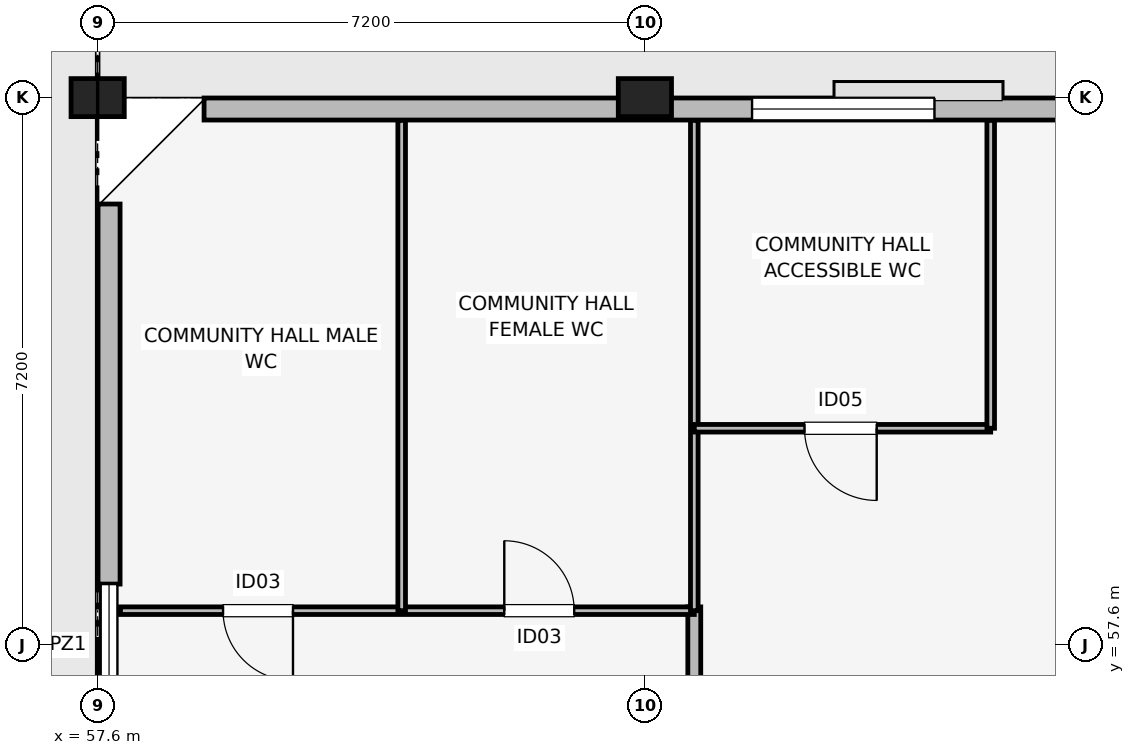
"""IFC4 building model, lengths in metres.
Left out: names, types, materials, properties, quantities, classifications, styles, units other than length and angle.
Written with IfcOpenShell. Run it as: python <this file> out.ifc"""

import sys

from ifc_helpers import new_model, si_unit, direction, frame, frame_2d, origin, origin_2d, place, context, subcontext, project, spatial, rectangle, extrude, element, fill, save


model = new_model("IFC4")
c1 = context("Model", 3, precision=1e-05, world=origin(), true_north=direction((0.0, 1.0)))
c2 = subcontext(c1, "Body", "Model", "MODEL_VIEW")
j1 = project(units=[si_unit("LENGTHUNIT", "METRE"), si_unit("PLANEANGLEUNIT", "RADIAN")], contexts=[c1])
p1 = place(None, origin())
s1 = spatial("IfcSite", under=j1, at=p1, CompositionType="ELEMENT")
p2 = place(p1, origin())
s2 = spatial("IfcBuilding", under=s1, at=p2, CompositionType="ELEMENT")
p3 = place(p2, origin())
s3 = spatial("IfcBuildingStorey", under=s2, at=p3, CompositionType="ELEMENT", Elevation=0.0)
for number, where, z_axis, x_axis in (
    (1, (57.6, 64.8, 0.0), (0.0, 0.0, 1.0), (0.0, 1.0, 0.0)),
    (2, (64.8, 64.8, 0.0), (0.0, 0.0, 1.0), (0.0, 1.0, 0.0)),
):
    element("IfcColumn", number, at=place(p3, frame(where, z_axis=z_axis, x_axis=x_axis)), inside=s3, PredefinedType="COLUMN", context=c2, shape_type="SweptSolid", body=[
        extrude(rectangle(XDim=0.5, YDim=0.7, at=origin_2d()), origin(), (0.0, 0.0, 1.0), 4.8),
    ])
p4 = place(p3, frame((59.0, 64.65, 0.0), z_axis=(0.0, 0.0, 1.0), x_axis=(1.0, 0.0, 0.0)))
e3 = element("IfcWall", 3, at=p4, inside=s3, PredefinedType="SOLIDWALL", context=c2, shape_type="SweptSolid", body=[
    extrude(rectangle(XDim=47.6, YDim=0.29, at=frame_2d((23.8, 0.0))), origin(), (0.0, 0.0, 1.0), 3.88),
])
p5 = place(p4, frame((15.85, 0.0, 0.0)))
e4 = element("IfcOpeningElement", 4, at=p5, cuts=e3, PredefinedType="OPENING", context=c2, shape_type="SweptSolid", body=[
    extrude(rectangle(XDim=1.5, YDim=2.35, at=frame_2d((0.75, 1.175))), frame((0.0, 0.155, 0.0), z_axis=(0.0, -1.0, 0.0), x_axis=(1.0, 0.0, 0.0)), (0.0, 0.0, 1.0), 0.31),
])
p6 = place(p4, frame((30.05, 0.0, 0.0)))
e5 = element("IfcOpeningElement", 5, at=p6, cuts=e3, PredefinedType="OPENING", context=c2, shape_type="SweptSolid", body=[
    extrude(rectangle(XDim=1.5, YDim=2.35, at=frame_2d((0.75, 1.175))), frame((0.0, 0.155, 0.0), z_axis=(0.0, -1.0, 0.0), x_axis=(1.0, 0.0, 0.0)), (0.0, 0.0, 1.0), 0.31),
])
p7 = place(p4, frame((7.21, 0.0, 2.85)))
e6 = element("IfcOpeningElement", 6, at=p7, cuts=e3, PredefinedType="OPENING", context=c2, shape_type="SweptSolid", body=[
    extrude(rectangle(XDim=2.4, YDim=0.9, at=frame_2d((1.2, 0.45))), frame((0.0, 0.155, 0.0), z_axis=(0.0, -1.0, 0.0), x_axis=(1.0, 0.0, 0.0)), (0.0, 0.0, 1.0), 0.31),
])
p8 = place(p4, frame((15.1, 0.0, 2.85)))
e7 = element("IfcOpeningElement", 7, at=p8, cuts=e3, PredefinedType="OPENING", context=c2, shape_type="SweptSolid", body=[
    extrude(rectangle(XDim=3.0, YDim=0.9, at=frame_2d((1.5, 0.45))), frame((0.0, 0.155, 0.0), z_axis=(0.0, -1.0, 0.0), x_axis=(1.0, 0.0, 0.0)), (0.0, 0.0, 1.0), 0.31),
])
p9 = place(p4, frame((22.6, 0.0, 2.85)))
e8 = element("IfcOpeningElement", 8, at=p9, cuts=e3, PredefinedType="OPENING", context=c2, shape_type="SweptSolid", body=[
    extrude(rectangle(XDim=2.4, YDim=0.9, at=frame_2d((1.2, 0.45))), frame((0.0, 0.155, 0.0), z_axis=(0.0, -1.0, 0.0), x_axis=(1.0, 0.0, 0.0)), (0.0, 0.0, 1.0), 0.31),
])
p10 = place(p4, frame((29.5, 0.0, 2.85)))
e9 = element("IfcOpeningElement", 9, at=p10, cuts=e3, PredefinedType="OPENING", context=c2, shape_type="SweptSolid", body=[
    extrude(rectangle(XDim=3.0, YDim=0.9, at=frame_2d((1.5, 0.45))), frame((0.0, 0.155, 0.0), z_axis=(0.0, -1.0, 0.0), x_axis=(1.0, 0.0, 0.0)), (0.0, 0.0, 1.0), 0.31),
])
p11 = place(p4, frame((37.0, 0.0, 2.85)))
e10 = element("IfcOpeningElement", 10, at=p11, cuts=e3, PredefinedType="OPENING", context=c2, shape_type="SweptSolid", body=[
    extrude(rectangle(XDim=2.4, YDim=0.9, at=frame_2d((1.2, 0.45))), frame((0.0, 0.155, 0.0), z_axis=(0.0, -1.0, 0.0), x_axis=(1.0, 0.0, 0.0)), (0.0, 0.0, 1.0), 0.31),
])
p12 = place(p4, frame((43.9, 0.0, 2.85)))
e11 = element("IfcOpeningElement", 11, at=p12, cuts=e3, PredefinedType="OPENING", context=c2, shape_type="SweptSolid", body=[
    extrude(rectangle(XDim=3.0, YDim=0.9, at=frame_2d((1.5, 0.45))), frame((0.0, 0.155, 0.0), z_axis=(0.0, -1.0, 0.0), x_axis=(1.0, 0.0, 0.0)), (0.0, 0.0, 1.0), 0.31),
])
p13 = place(p3, frame((57.75, 58.4, 0.0), z_axis=(0.0, 0.0, 1.0), x_axis=(0.0, 1.0, 0.0)))
e12 = element("IfcWall", 12, at=p13, inside=s3, PredefinedType="SOLIDWALL", context=c2, shape_type="SweptSolid", body=[
    extrude(rectangle(XDim=5.0, YDim=0.29, at=frame_2d((2.5, 0.0))), origin(), (0.0, 0.0, 1.0), 4.276),
])
p14 = place(p3, frame((65.45, 43.5, 0.0), z_axis=(0.0, 0.0, 1.0), x_axis=(0.0, 1.0, 0.0)))
e13 = element("IfcWall", 13, at=p14, inside=s3, PredefinedType="PARTITIONING", context=c2, shape_type="SweptSolid", body=[
    extrude(rectangle(XDim=14.6, YDim=0.17, at=frame_2d((7.3, 0.0))), origin(), (0.0, 0.0, 1.0), 3.8),
])
p15 = place(p14, frame((4.2, 0.0, 0.0)))
e14 = element("IfcOpeningElement", 14, at=p15, cuts=e13, PredefinedType="OPENING", context=c2, shape_type="SweptSolid", body=[
    extrude(rectangle(XDim=1.5, YDim=2.28, at=frame_2d((0.75, 1.14))), frame((0.0, 0.095, 0.0), z_axis=(0.0, -1.0, 0.0), x_axis=(1.0, 0.0, 0.0)), (0.0, 0.0, 1.0), 0.19),
])
p16 = place(p14, frame((8.6, 0.0, 0.0)))
e15 = element("IfcOpeningElement", 15, at=p16, cuts=e13, PredefinedType="OPENING", context=c2, shape_type="SweptSolid", body=[
    extrude(rectangle(XDim=1.5, YDim=2.28, at=frame_2d((0.75, 1.14))), frame((0.0, 0.095, 0.0), z_axis=(0.0, -1.0, 0.0), x_axis=(1.0, 0.0, 0.0)), (0.0, 0.0, 1.0), 0.19),
])
p17 = place(p3, frame((57.9, 58.05, 0.0), z_axis=(0.0, 0.0, 1.0), x_axis=(1.0, 0.0, 0.0)))
e16 = element("IfcWall", 16, at=p17, inside=s3, PredefinedType="PARTITIONING", context=c2, shape_type="SweptSolid", body=[
    extrude(rectangle(XDim=7.55, YDim=0.1, at=frame_2d((3.775, 0.0))), origin(), (0.0, 0.0, 1.0), 3.8),
])
p18 = place(p17, frame((2.27, 0.0, 0.0), z_axis=(0.0, 0.0, 1.0), x_axis=(-1.0, 0.0, 0.0)))
e17 = element("IfcOpeningElement", 17, at=p18, cuts=e16, PredefinedType="OPENING", context=c2, shape_type="SweptSolid", body=[
    extrude(rectangle(XDim=0.92, YDim=2.12, at=frame_2d((0.46, 1.06))), frame((0.0, 0.06, 0.0), z_axis=(0.0, -1.0, 0.0), x_axis=(1.0, 0.0, 0.0)), (0.0, 0.0, 1.0), 0.12),
])
p19 = place(p17, frame((5.05, 0.0, 0.0)))
e18 = element("IfcOpeningElement", 18, at=p19, cuts=e16, PredefinedType="OPENING", context=c2, shape_type="SweptSolid", body=[
    extrude(rectangle(XDim=0.92, YDim=2.12, at=frame_2d((0.46, 1.06))), frame((0.0, 0.06, 0.0), z_axis=(0.0, -1.0, 0.0), x_axis=(1.0, 0.0, 0.0)), (0.0, 0.0, 1.0), 0.12),
])
for number, where, z_axis, x_axis in (
    (19, (61.6, 58.05, 0.0), (0.0, 0.0, 1.0), (0.0, 1.0, 0.0)),
    (20, (65.45, 58.05, 0.0), (0.0, 0.0, 1.0), (0.0, 1.0, 0.0)),
):
    element("IfcWall", number, at=place(p3, frame(where, z_axis=z_axis, x_axis=x_axis)), inside=s3, PredefinedType="PARTITIONING", context=c2, shape_type="SweptSolid", body=[
        extrude(rectangle(XDim=6.45, YDim=0.1, at=frame_2d((3.225, 0.0))), origin(), (0.0, 0.0, 1.0), 3.8),
    ])
p20 = place(p3, frame((65.45, 60.45, 0.0), z_axis=(0.0, 0.0, 1.0), x_axis=(1.0, 0.0, 0.0)))
e21 = element("IfcWall", 21, at=p20, inside=s3, PredefinedType="PARTITIONING", context=c2, shape_type="SweptSolid", body=[
    extrude(rectangle(XDim=3.9, YDim=0.1, at=frame_2d((1.95, 0.0))), origin(), (0.0, 0.0, 1.0), 3.8),
])
p21 = place(p20, frame((2.4, 0.0, 0.0), z_axis=(0.0, 0.0, 1.0), x_axis=(-1.0, 0.0, 0.0)))
e22 = element("IfcOpeningElement", 22, at=p21, cuts=e21, PredefinedType="OPENING", context=c2, shape_type="SweptSolid", body=[
    extrude(rectangle(XDim=0.95, YDim=2.12, at=frame_2d((0.475, 1.06))), frame((0.0, 0.06, 0.0), z_axis=(0.0, -1.0, 0.0), x_axis=(1.0, 0.0, 0.0)), (0.0, 0.0, 1.0), 0.12),
])
p22 = place(p3, frame((69.35, 60.45, 0.0), z_axis=(0.0, 0.0, 1.0), x_axis=(0.0, 1.0, 0.0)))
e23 = element("IfcWall", 23, at=p22, inside=s3, PredefinedType="PARTITIONING", context=c2, shape_type="SweptSolid", body=[
    extrude(rectangle(XDim=4.05, YDim=0.1, at=frame_2d((2.025, 0.0))), origin(), (0.0, 0.0, 1.0), 3.8),
])
p23 = place(p7, origin())
e24 = element("IfcWindow", 24, at=p23, inside=s3, PartitioningType="SINGLE_PANEL", PredefinedType="WINDOW", context=c2, shape_type="SweptSolid", body=[
    extrude(rectangle(XDim=2.4, YDim=0.9, at=frame_2d((1.2, 0.45))), frame((0.0, 0.03, 0.0), z_axis=(0.0, -1.0, 0.0), x_axis=(1.0, 0.0, 0.0)), (0.0, 0.0, 1.0), 0.06),
])
fill(e6, e24)
p24 = place(p18, origin())
e25 = element("IfcDoor", 25, at=p24, inside=s3, OperationType="SINGLE_SWING_RIGHT", PredefinedType="DOOR", context=c2, shape_type="SweptSolid", body=[
    extrude(rectangle(XDim=0.92, YDim=2.12, at=frame_2d((0.46, 1.06))), frame((0.0, 0.025, 0.0), z_axis=(0.0, -1.0, 0.0), x_axis=(1.0, 0.0, 0.0)), (0.0, 0.0, 1.0), 0.05),
])
fill(e17, e25)
p25 = place(p19, origin())
e26 = element("IfcDoor", 26, at=p25, inside=s3, OperationType="SINGLE_SWING_LEFT", PredefinedType="DOOR", context=c2, shape_type="SweptSolid", body=[
    extrude(rectangle(XDim=0.92, YDim=2.12, at=frame_2d((0.46, 1.06))), frame((0.0, 0.025, 0.0), z_axis=(0.0, -1.0, 0.0), x_axis=(1.0, 0.0, 0.0)), (0.0, 0.0, 1.0), 0.05),
])
fill(e18, e26)
p26 = place(p21, origin())
e27 = element("IfcDoor", 27, at=p26, inside=s3, OperationType="SINGLE_SWING_RIGHT", PredefinedType="DOOR", context=c2, shape_type="SweptSolid", body=[
    extrude(rectangle(XDim=0.95, YDim=2.12, at=frame_2d((0.475, 1.06))), frame((0.0, 0.025, 0.0), z_axis=(0.0, -1.0, 0.0), x_axis=(1.0, 0.0, 0.0)), (0.0, 0.0, 1.0), 0.05),
])
fill(e22, e27)
save(model, sys.argv[1])
